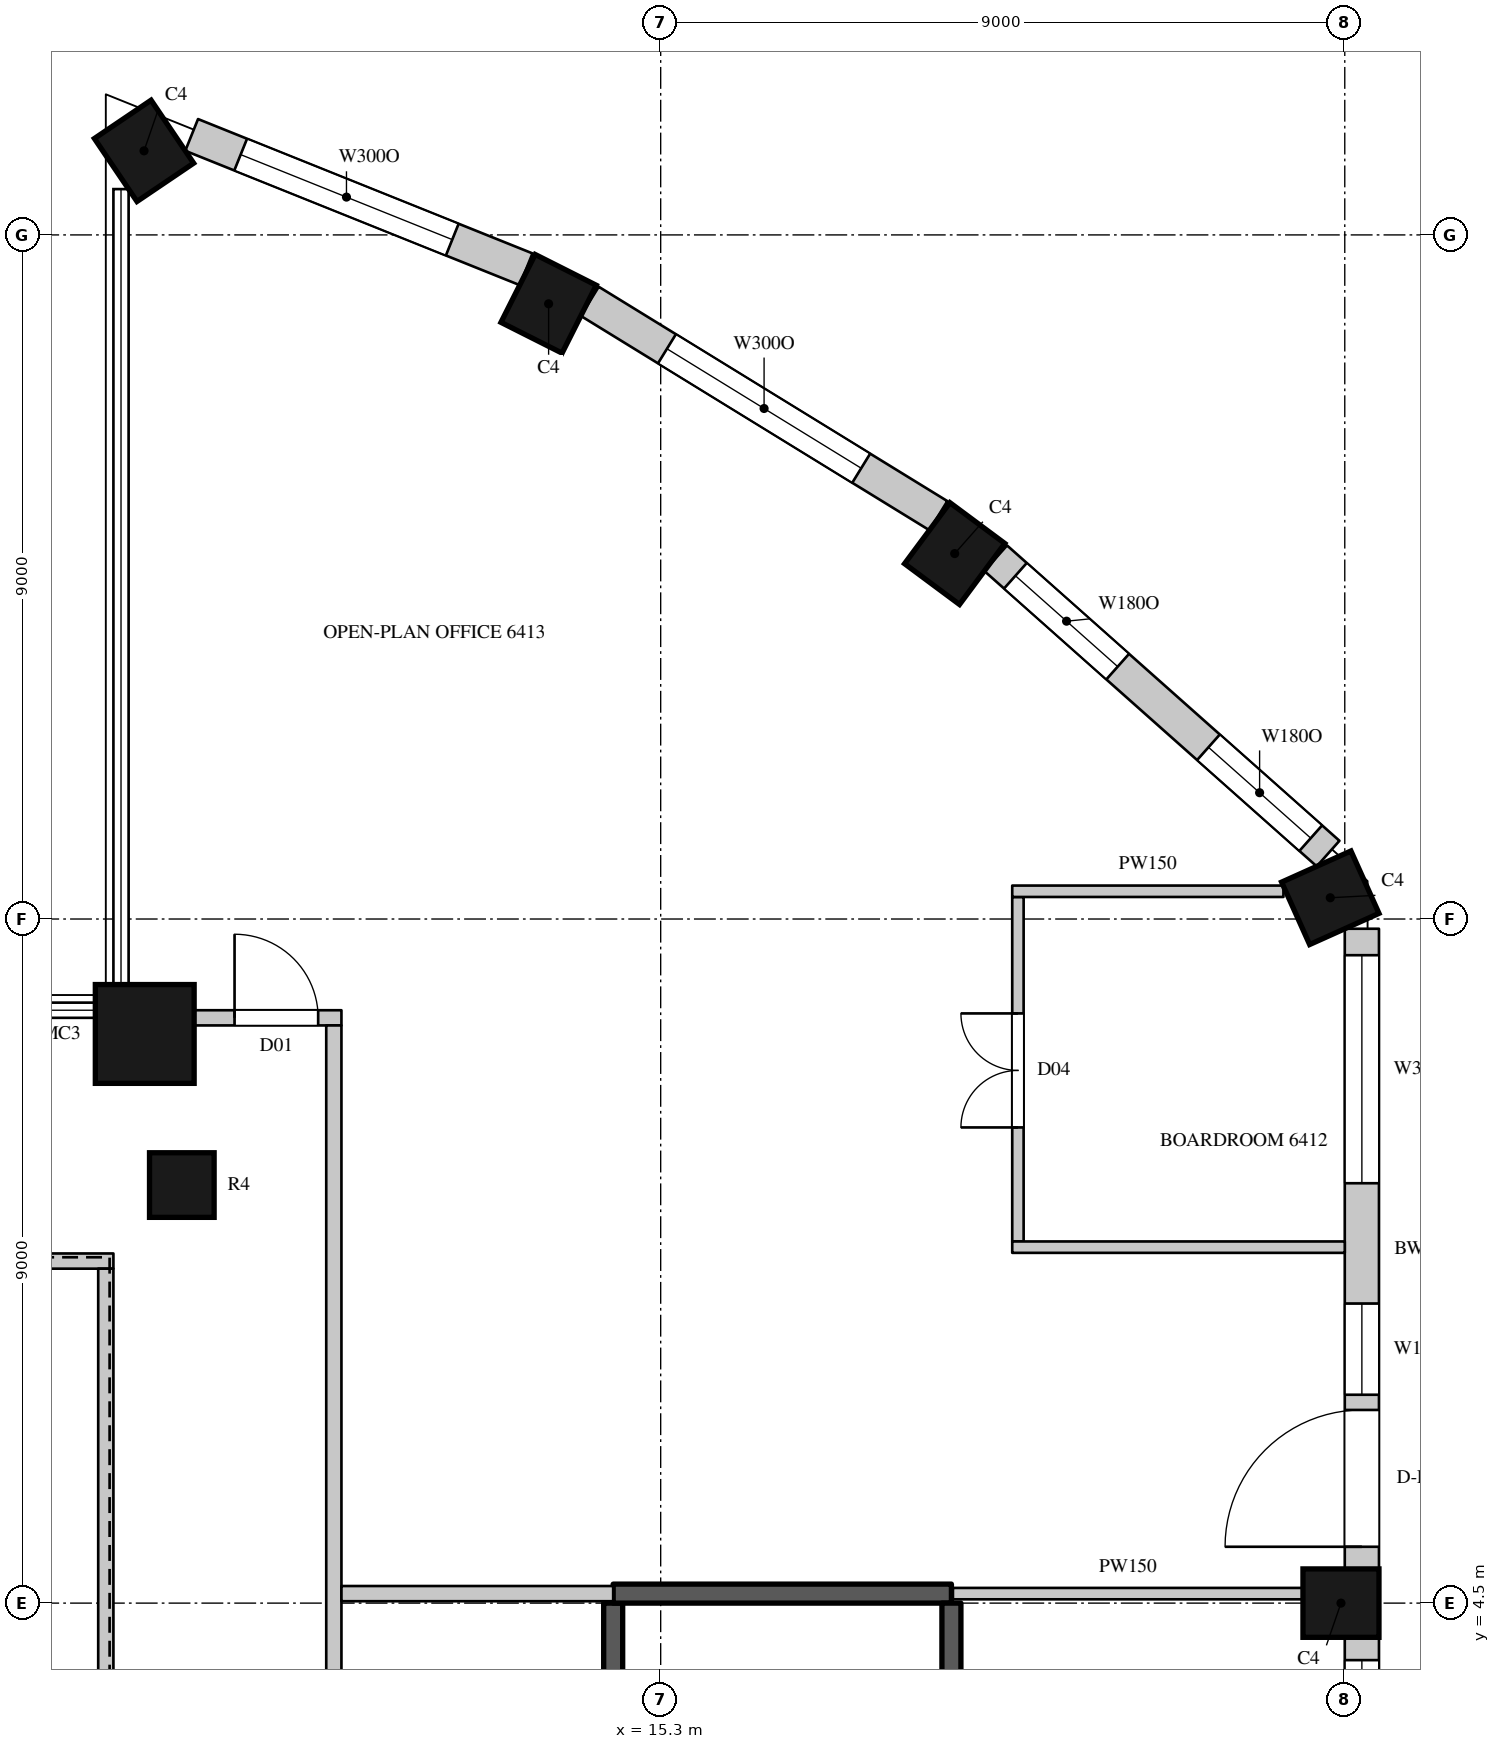
"""IFC4 building model, lengths in metres.
Left out: names, types, materials, properties, quantities, classifications, styles, units other than length and angle.
Written with IfcOpenShell. Run it as: python <this file> out.ifc"""

import sys

from ifc_helpers import new_model, si_unit, direction, frame, frame_2d, origin, origin_2d, place, context, subcontext, project, spatial, rectangle, circle, extrude, element, fill, save


model = new_model("IFC4")
c1 = context("Model", 3, precision=1e-05, world=origin(), true_north=direction((0.0, 1.0)))
c2 = subcontext(c1, "Body", "Model", "MODEL_VIEW")
j1 = project(units=[si_unit("LENGTHUNIT", "METRE"), si_unit("PLANEANGLEUNIT", "RADIAN")], contexts=[c1])
p1 = place(None, origin())
s1 = spatial("IfcSite", under=j1, at=p1, CompositionType="ELEMENT")
p2 = place(p1, origin())
s2 = spatial("IfcBuilding", under=s1, at=p2, CompositionType="ELEMENT")
p3 = place(p2, frame((0.0, 0.0, 284.4)))
s3 = spatial("IfcBuildingStorey", under=s2, at=p3, CompositionType="ELEMENT", Elevation=284.4)
p4 = place(p3, frame((8.503, 23.606, 0.0), z_axis=(0.0, 0.0, 1.0), x_axis=(-0.828469606019, -0.560034027451, 0.0)))
e1 = element("IfcColumn", 1, at=p4, inside=s3, PredefinedType="COLUMN", context=c2, shape_type="SweptSolid", body=[
    extrude(rectangle(XDim=0.9, YDim=1.0, at=origin_2d()), origin(), (0.0, 0.0, 1.0), 4.1),
])
p5 = place(p3, frame((8.512, 11.988, 0.0), z_axis=(0.0, 0.0, 1.0), x_axis=(1.0, 0.0, 0.0)))
e2 = element("IfcColumn", 2, at=p5, inside=s3, PredefinedType="COLUMN", context=c2, shape_type="SweptSolid", body=[
    extrude(circle(Radius=0.65, at=origin_2d()), origin(), (0.0, 0.0, 1.0), 4.1),
])
for number, where, z_axis, x_axis in (
    (3, (24.25, 4.5, 0.0), (0.0, 0.0, 1.0), (0.0, 1.0, 0.0)),
    (4, (24.11, 13.78, 0.0), (0.0, 0.0, 1.0), (-0.41, 0.912, 0.0)),
    (5, (19.168, 18.308, 0.0), (0.0, 0.0, 1.0), (-0.803, 0.596, 0.0)),
    (6, (13.826, 21.594, 0.0), (0.0, 0.0, 1.0), (-0.893, 0.45, 0.0)),
):
    element("IfcColumn", number, at=place(p3, frame(where, z_axis=z_axis, x_axis=x_axis)), inside=s3, PredefinedType="COLUMN", context=c2, shape_type="SweptSolid", body=[
        extrude(rectangle(XDim=0.9, YDim=1.0, at=origin_2d()), origin(), (0.0, 0.0, 1.0), 4.1),
    ])
p6 = place(p3, frame((9.0, 10.0, 0.0), z_axis=(0.0, 0.0, 1.0), x_axis=(1.0, 0.0, 0.0)))
e7 = element("IfcColumn", 7, at=p6, inside=s3, PredefinedType="COLUMN", context=c2, shape_type="SweptSolid", body=[
    extrude(circle(Radius=0.425, at=origin_2d()), origin(), (0.0, 0.0, 1.0), 4.1),
])
p7 = place(p3, frame((24.525, -4.05, 0.0), z_axis=(0.0, 0.0, 1.0), x_axis=(0.0, 1.0, 0.0)))
e8 = element("IfcWall", 8, at=p7, inside=s3, PredefinedType="SOLIDWALL", context=c2, shape_type="SweptSolid", body=[
    extrude(rectangle(XDim=8.1, YDim=0.45, at=frame_2d((4.05, 0.0))), origin(), (0.0, 0.0, 1.0), 3.8),
])
p8 = place(p7, frame((0.3, 0.0, 1.05)))
e9 = element("IfcOpeningElement", 9, at=p8, cuts=e8, PredefinedType="OPENING", context=c2, shape_type="SweptSolid", body=[
    extrude(rectangle(XDim=3.0, YDim=2.4, at=frame_2d((1.5, 1.2))), frame((0.0, 0.235, 0.0), z_axis=(0.0, -1.0, 0.0), x_axis=(1.0, 0.0, 0.0)), (0.0, 0.0, 1.0), 0.47),
])
p9 = place(p7, frame((4.8, 0.0, 1.05)))
e10 = element("IfcOpeningElement", 10, at=p9, cuts=e8, PredefinedType="OPENING", context=c2, shape_type="SweptSolid", body=[
    extrude(rectangle(XDim=3.0, YDim=2.4, at=frame_2d((1.5, 1.2))), frame((0.0, 0.235, 0.0), z_axis=(0.0, -1.0, 0.0), x_axis=(1.0, 0.0, 0.0)), (0.0, 0.0, 1.0), 0.47),
])
p10 = place(p3, frame((24.525, 4.95, 0.0), z_axis=(0.0, 0.0, 1.0), x_axis=(0.0, 1.0, 0.0)))
e11 = element("IfcWall", 11, at=p10, inside=s3, PredefinedType="SOLIDWALL", context=c2, shape_type="SweptSolid", body=[
    extrude(rectangle(XDim=8.422, YDim=0.45, at=frame_2d((4.211, 0.0))), origin(), (0.0, 0.0, 1.0), 3.8),
])
p11 = place(p10, frame((0.291, 0.0, 0.0)))
e12 = element("IfcOpeningElement", 12, at=p11, cuts=e11, PredefinedType="OPENING", context=c2, shape_type="SweptSolid", body=[
    extrude(rectangle(XDim=1.8, YDim=2.4, at=frame_2d((0.9, 1.2))), frame((0.0, 0.235, 0.0), z_axis=(0.0, -1.0, 0.0), x_axis=(1.0, 0.0, 0.0)), (0.0, 0.0, 1.0), 0.47),
])
p12 = place(p10, frame((2.291, 0.0, 1.05)))
e13 = element("IfcOpeningElement", 13, at=p12, cuts=e11, PredefinedType="OPENING", context=c2, shape_type="SweptSolid", body=[
    extrude(rectangle(XDim=1.2, YDim=2.4, at=frame_2d((0.6, 1.2))), frame((0.0, 0.235, 0.0), z_axis=(0.0, -1.0, 0.0), x_axis=(1.0, 0.0, 0.0)), (0.0, 0.0, 1.0), 0.47),
])
p13 = place(p10, frame((5.074, 0.0, 1.05)))
e14 = element("IfcOpeningElement", 14, at=p13, cuts=e11, PredefinedType="OPENING", context=c2, shape_type="SweptSolid", body=[
    extrude(rectangle(XDim=3.0, YDim=2.4, at=frame_2d((1.5, 1.2))), frame((0.0, 0.235, 0.0), z_axis=(0.0, -1.0, 0.0), x_axis=(1.0, 0.0, 0.0)), (0.0, 0.0, 1.0), 0.47),
])
p14 = place(p3, frame((24.081, 14.361, 0.0), z_axis=(0.0, 0.0, 1.0), x_axis=(-0.747570482973, 0.664182484704, 0.0)))
e15 = element("IfcWall", 15, at=p14, inside=s3, PredefinedType="SOLIDWALL", context=c2, shape_type="SweptSolid", body=[
    extrude(rectangle(XDim=5.85, YDim=0.45, at=frame_2d((2.925, 0.0))), origin(), (0.0, 0.0, 1.0), 3.8),
])
p15 = place(p14, frame((0.305, 0.0, 1.05)))
e16 = element("IfcOpeningElement", 16, at=p15, cuts=e15, PredefinedType="OPENING", context=c2, shape_type="SweptSolid", body=[
    extrude(rectangle(XDim=1.8, YDim=2.4, at=frame_2d((0.9, 1.2))), frame((0.0, 0.235, 0.0), z_axis=(0.0, -1.0, 0.0), x_axis=(1.0, 0.0, 0.0)), (0.0, 0.0, 1.0), 0.47),
])
p16 = place(p14, frame((3.703, 0.0, 1.05)))
e17 = element("IfcOpeningElement", 17, at=p16, cuts=e15, PredefinedType="OPENING", context=c2, shape_type="SweptSolid", body=[
    extrude(rectangle(XDim=1.8, YDim=2.4, at=frame_2d((0.9, 1.2))), frame((0.0, 0.235, 0.0), z_axis=(0.0, -1.0, 0.0), x_axis=(1.0, 0.0, 0.0)), (0.0, 0.0, 1.0), 0.47),
])
p17 = place(p3, frame((18.953, 18.806, 0.0), z_axis=(0.0, 0.0, 1.0), x_axis=(-0.851860664503, 0.523768468193, 0.0)))
e18 = element("IfcWall", 18, at=p17, inside=s3, PredefinedType="SOLIDWALL", context=c2, shape_type="SweptSolid", body=[
    extrude(rectangle(XDim=5.384, YDim=0.45, at=frame_2d((2.692, 0.0))), origin(), (0.0, 0.0, 1.0), 3.8),
])
p18 = place(p17, frame((1.192, 0.0, 1.05)))
e19 = element("IfcOpeningElement", 19, at=p18, cuts=e18, PredefinedType="OPENING", context=c2, shape_type="SweptSolid", body=[
    extrude(rectangle(XDim=3.0, YDim=2.4, at=frame_2d((1.5, 1.2))), frame((0.0, 0.235, 0.0), z_axis=(0.0, -1.0, 0.0), x_axis=(1.0, 0.0, 0.0)), (0.0, 0.0, 1.0), 0.47),
])
p19 = place(p3, frame((13.529, 22.048, 0.0), z_axis=(0.0, 0.0, 1.0), x_axis=(-0.927957332619, 0.372686448424, 0.0)))
e20 = element("IfcWall", 20, at=p19, inside=s3, PredefinedType="SOLIDWALL", context=c2, shape_type="SweptSolid", body=[
    extrude(rectangle(XDim=4.741, YDim=0.45, at=frame_2d((2.371, 0.0))), origin(), (0.0, 0.0, 1.0), 3.8),
])
p20 = place(p19, frame((1.047, 0.0, 1.05)))
e21 = element("IfcOpeningElement", 21, at=p20, cuts=e20, PredefinedType="OPENING", context=c2, shape_type="SweptSolid", body=[
    extrude(rectangle(XDim=3.0, YDim=2.4, at=frame_2d((1.5, 1.2))), frame((0.0, 0.235, 0.0), z_axis=(0.0, -1.0, 0.0), x_axis=(1.0, 0.0, 0.0)), (0.0, 0.0, 1.0), 0.47),
])
p21 = place(p3, frame((-2.48, 9.0, 0.0), z_axis=(0.0, 0.0, 1.0), x_axis=(1.0, 0.0, 0.0)))
e22 = element("IfcWall", 22, at=p21, inside=s3, PredefinedType="PARTITIONING", context=c2, shape_type="SweptSolid", body=[
    extrude(rectangle(XDim=10.58, YDim=0.2, at=frame_2d((5.29, 0.0))), origin(), (0.0, 0.0, 1.0), 3.8),
])
p22 = place(p3, frame((8.0, -8.9, 0.0), z_axis=(0.0, 0.0, 1.0), x_axis=(0.0, 1.0, 0.0)))
e23 = element("IfcWall", 23, at=p22, inside=s3, PredefinedType="PARTITIONING", context=c2, shape_type="SweptSolid", body=[
    extrude(rectangle(XDim=17.8, YDim=0.2, at=frame_2d((8.9, 0.0))), origin(), (0.0, 0.0, 1.0), 3.8),
])
p23 = place(p3, frame((9.144, 12.2, 0.0), z_axis=(0.0, 0.0, 1.0), x_axis=(1.0, 0.0, 0.0)))
e24 = element("IfcWall", 24, at=p23, inside=s3, PredefinedType="PARTITIONING", context=c2, shape_type="SweptSolid", body=[
    extrude(rectangle(XDim=1.956, YDim=0.2, at=frame_2d((0.978, 0.0))), origin(), (0.0, 0.0, 1.0), 3.8),
])
p24 = place(p23, frame((0.55, 0.0, 0.0)))
e25 = element("IfcOpeningElement", 25, at=p24, cuts=e24, PredefinedType="OPENING", context=c2, shape_type="SweptSolid", body=[
    extrude(rectangle(XDim=1.1, YDim=2.4, at=frame_2d((0.55, 1.2))), frame((0.0, 0.11, 0.0), z_axis=(0.0, -1.0, 0.0), x_axis=(1.0, 0.0, 0.0)), (0.0, 0.0, 1.0), 0.22),
])
p25 = place(p3, frame((11.0, -12.0, 0.0), z_axis=(0.0, 0.0, 1.0), x_axis=(0.0, 1.0, 0.0)))
e26 = element("IfcWall", 26, at=p25, inside=s3, PredefinedType="PARTITIONING", context=c2, shape_type="SweptSolid", body=[
    extrude(rectangle(XDim=24.1, YDim=0.2, at=frame_2d((12.05, 0.0))), origin(), (0.0, 0.0, 1.0), 3.8),
])
p26 = place(p25, frame((9.85, 0.0, 0.0)))
e27 = element("IfcOpeningElement", 27, at=p26, cuts=e26, PredefinedType="OPENING", context=c2, shape_type="SweptSolid", body=[
    extrude(rectangle(XDim=1.5, YDim=2.4, at=frame_2d((0.75, 1.2))), frame((0.0, 0.11, 0.0), z_axis=(0.0, -1.0, 0.0), x_axis=(1.0, 0.0, 0.0)), (0.0, 0.0, 1.0), 0.22),
])
p27 = place(p25, frame((4.55, 0.0, 0.0)))
e28 = element("IfcOpeningElement", 28, at=p27, cuts=e26, PredefinedType="OPENING", context=c2, shape_type="SweptSolid", body=[
    extrude(rectangle(XDim=1.1, YDim=2.4, at=frame_2d((0.55, 1.2))), frame((0.0, 0.11, 0.0), z_axis=(0.0, -1.0, 0.0), x_axis=(1.0, 0.0, 0.0)), (0.0, 0.0, 1.0), 0.22),
])
p28 = place(p3, frame((11.1, 4.625, 0.0), z_axis=(0.0, 0.0, 1.0), x_axis=(1.0, 0.0, 0.0)))
e29 = element("IfcWall", 29, at=p28, inside=s3, PredefinedType="PARTITIONING", context=c2, shape_type="SweptSolid", body=[
    extrude(rectangle(XDim=3.575, YDim=0.2, at=frame_2d((1.788, 0.0))), origin(), (0.0, 0.0, 1.0), 3.8),
])
p29 = place(p3, frame((19.145, 4.625, 0.0), z_axis=(0.0, 0.0, 1.0), x_axis=(1.0, 0.0, 0.0)))
e30 = element("IfcWall", 30, at=p29, inside=s3, PredefinedType="PARTITIONING", context=c2, shape_type="SweptSolid", body=[
    extrude(rectangle(XDim=4.605, YDim=0.15, at=frame_2d((2.302, 0.0))), origin(), (0.0, 0.0, 1.0), 3.8),
])
p30 = place(p3, frame((20.0, 9.258, 0.0), z_axis=(0.0, 0.0, 1.0), x_axis=(0.0, 1.0, 0.0)))
e31 = element("IfcWall", 31, at=p30, inside=s3, PredefinedType="PARTITIONING", context=c2, shape_type="SweptSolid", body=[
    extrude(rectangle(XDim=4.532, YDim=0.15, at=frame_2d((2.266, 0.0))), origin(), (0.0, 0.0, 1.0), 3.8),
])
p31 = place(p30, frame((1.5, 0.0, 0.0)))
e32 = element("IfcOpeningElement", 32, at=p31, cuts=e31, PredefinedType="OPENING", context=c2, shape_type="SweptSolid", body=[
    extrude(rectangle(XDim=1.5, YDim=2.2, at=frame_2d((0.75, 1.1))), frame((0.0, 0.085, 0.0), z_axis=(0.0, -1.0, 0.0), x_axis=(1.0, 0.0, 0.0)), (0.0, 0.0, 1.0), 0.17),
])
p32 = place(p3, frame((19.925, 9.183, 0.0), z_axis=(0.0, 0.0, 1.0), x_axis=(1.0, 0.0, 0.0)))
e33 = element("IfcWall", 33, at=p32, inside=s3, PredefinedType="PARTITIONING", context=c2, shape_type="SweptSolid", body=[
    extrude(rectangle(XDim=4.375, YDim=0.15, at=frame_2d((2.188, 0.0))), origin(), (0.0, 0.0, 1.0), 3.15),
])
p33 = place(p3, frame((19.925, 13.865, 0.0), z_axis=(0.0, 0.0, 1.0), x_axis=(1.0, 0.0, 0.0)))
e34 = element("IfcWall", 34, at=p33, inside=s3, PredefinedType="PARTITIONING", context=c2, shape_type="SweptSolid", body=[
    extrude(rectangle(XDim=3.568, YDim=0.15, at=frame_2d((1.784, 0.0))), origin(), (0.0, 0.0, 1.0), 3.8),
])
p34 = place(p3, frame((14.675, -4.5, 0.0), z_axis=(0.0, 0.0, 1.0), x_axis=(0.0, 1.0, 0.0)))
e35 = element("IfcWall", 35, at=p34, inside=s3, PredefinedType="SHEAR", context=c2, shape_type="SweptSolid", body=[
    extrude(rectangle(XDim=9.0, YDim=0.25, at=frame_2d((4.5, 0.0))), origin(), (0.0, 0.0, 1.0), 3.8),
])
p35 = place(p34, frame((0.45, 0.0, 0.0)))
e36 = element("IfcOpeningElement", 36, at=p35, cuts=e35, PredefinedType="OPENING", context=c2, shape_type="SweptSolid", body=[
    extrude(rectangle(XDim=1.1, YDim=2.2, at=frame_2d((0.55, 1.1))), frame((0.0, 0.135, 0.0), z_axis=(0.0, -1.0, 0.0), x_axis=(1.0, 0.0, 0.0)), (0.0, 0.0, 1.0), 0.27),
])
p36 = place(p3, frame((14.675, 4.625, 0.0), z_axis=(0.0, 0.0, 1.0), x_axis=(1.0, 0.0, 0.0)))
e37 = element("IfcWall", 37, at=p36, inside=s3, PredefinedType="SHEAR", context=c2, shape_type="SweptSolid", body=[
    extrude(rectangle(XDim=4.45, YDim=0.25, at=frame_2d((2.225, 0.0))), origin(), (0.0, 0.0, 1.0), 3.8),
])
p37 = place(p3, frame((19.125, -4.5, 0.0), z_axis=(0.0, 0.0, 1.0), x_axis=(0.0, 1.0, 0.0)))
e38 = element("IfcWall", 38, at=p37, inside=s3, PredefinedType="SHEAR", context=c2, shape_type="SweptSolid", body=[
    extrude(rectangle(XDim=9.0, YDim=0.25, at=frame_2d((4.5, 0.0))), origin(), (0.0, 0.0, 1.0), 3.8),
])
p38 = place(p9, origin())
e39 = element("IfcWindow", 39, at=p38, inside=s3, PartitioningType="SINGLE_PANEL", PredefinedType="WINDOW", context=c2, shape_type="SweptSolid", body=[
    extrude(rectangle(XDim=3.0, YDim=2.4, at=frame_2d((1.5, 1.2))), frame((0.0, 0.135, 0.0), z_axis=(0.0, -1.0, 0.0), x_axis=(1.0, 0.0, 0.0)), (0.0, 0.0, 1.0), 0.06),
])
fill(e10, e39)
p39 = place(p11, origin())
e40 = element("IfcDoor", 40, at=p39, inside=s3, OperationType="SLIDING_TO_LEFT", PredefinedType="DOOR", context=c2, shape_type="SweptSolid", body=[
    extrude(rectangle(XDim=1.8, YDim=2.4, at=frame_2d((0.9, 1.2))), frame((0.0, 0.13, 0.0), z_axis=(0.0, -1.0, 0.0), x_axis=(1.0, 0.0, 0.0)), (0.0, 0.0, 1.0), 0.05),
])
fill(e12, e40)
p40 = place(p12, origin())
e41 = element("IfcWindow", 41, at=p40, inside=s3, PartitioningType="SINGLE_PANEL", PredefinedType="WINDOW", context=c2, shape_type="SweptSolid", body=[
    extrude(rectangle(XDim=1.2, YDim=2.4, at=frame_2d((0.6, 1.2))), frame((0.0, 0.135, 0.0), z_axis=(0.0, -1.0, 0.0), x_axis=(1.0, 0.0, 0.0)), (0.0, 0.0, 1.0), 0.06),
])
fill(e13, e41)
p41 = place(p13, origin())
e42 = element("IfcWindow", 42, at=p41, inside=s3, PartitioningType="SINGLE_PANEL", PredefinedType="WINDOW", context=c2, shape_type="SweptSolid", body=[
    extrude(rectangle(XDim=3.0, YDim=2.4, at=frame_2d((1.5, 1.2))), frame((0.0, 0.135, 0.0), z_axis=(0.0, -1.0, 0.0), x_axis=(1.0, 0.0, 0.0)), (0.0, 0.0, 1.0), 0.06),
])
fill(e14, e42)
p42 = place(p15, origin())
e43 = element("IfcWindow", 43, at=p42, inside=s3, PartitioningType="SINGLE_PANEL", PredefinedType="WINDOW", context=c2, shape_type="SweptSolid", body=[
    extrude(rectangle(XDim=1.8, YDim=2.4, at=frame_2d((0.9, 1.2))), frame((0.0, 0.135, 0.0), z_axis=(0.0, -1.0, 0.0), x_axis=(1.0, 0.0, 0.0)), (0.0, 0.0, 1.0), 0.06),
])
fill(e16, e43)
p43 = place(p16, origin())
e44 = element("IfcWindow", 44, at=p43, inside=s3, PartitioningType="SINGLE_PANEL", PredefinedType="WINDOW", context=c2, shape_type="SweptSolid", body=[
    extrude(rectangle(XDim=1.8, YDim=2.4, at=frame_2d((0.9, 1.2))), frame((0.0, 0.135, 0.0), z_axis=(0.0, -1.0, 0.0), x_axis=(1.0, 0.0, 0.0)), (0.0, 0.0, 1.0), 0.06),
])
fill(e17, e44)
p44 = place(p18, origin())
e45 = element("IfcWindow", 45, at=p44, inside=s3, PartitioningType="SINGLE_PANEL", PredefinedType="WINDOW", context=c2, shape_type="SweptSolid", body=[
    extrude(rectangle(XDim=3.0, YDim=2.4, at=frame_2d((1.5, 1.2))), frame((0.0, 0.135, 0.0), z_axis=(0.0, -1.0, 0.0), x_axis=(1.0, 0.0, 0.0)), (0.0, 0.0, 1.0), 0.06),
])
fill(e19, e45)
p45 = place(p20, origin())
e46 = element("IfcWindow", 46, at=p45, inside=s3, PartitioningType="SINGLE_PANEL", PredefinedType="WINDOW", context=c2, shape_type="SweptSolid", body=[
    extrude(rectangle(XDim=3.0, YDim=2.4, at=frame_2d((1.5, 1.2))), frame((0.0, 0.135, 0.0), z_axis=(0.0, -1.0, 0.0), x_axis=(1.0, 0.0, 0.0)), (0.0, 0.0, 1.0), 0.06),
])
fill(e21, e46)
p46 = place(p24, origin())
e47 = element("IfcDoor", 47, at=p46, inside=s3, OperationType="SINGLE_SWING_LEFT", PredefinedType="DOOR", context=c2, shape_type="SweptSolid", body=[
    extrude(rectangle(XDim=1.1, YDim=2.4, at=frame_2d((0.55, 1.2))), frame((0.0, 0.025, 0.0), z_axis=(0.0, -1.0, 0.0), x_axis=(1.0, 0.0, 0.0)), (0.0, 0.0, 1.0), 0.05),
])
fill(e25, e47)
p47 = place(p31, origin())
e48 = element("IfcDoor", 48, at=p47, inside=s3, OperationType="DOUBLE_DOOR_SINGLE_SWING", PredefinedType="DOOR", context=c2, shape_type="SweptSolid", body=[
    extrude(rectangle(XDim=1.5, YDim=2.2, at=frame_2d((0.75, 1.1))), frame((0.0, 0.025, 0.0), z_axis=(0.0, -1.0, 0.0), x_axis=(1.0, 0.0, 0.0)), (0.0, 0.0, 1.0), 0.05),
])
fill(e32, e48)
save(model, sys.argv[1])
